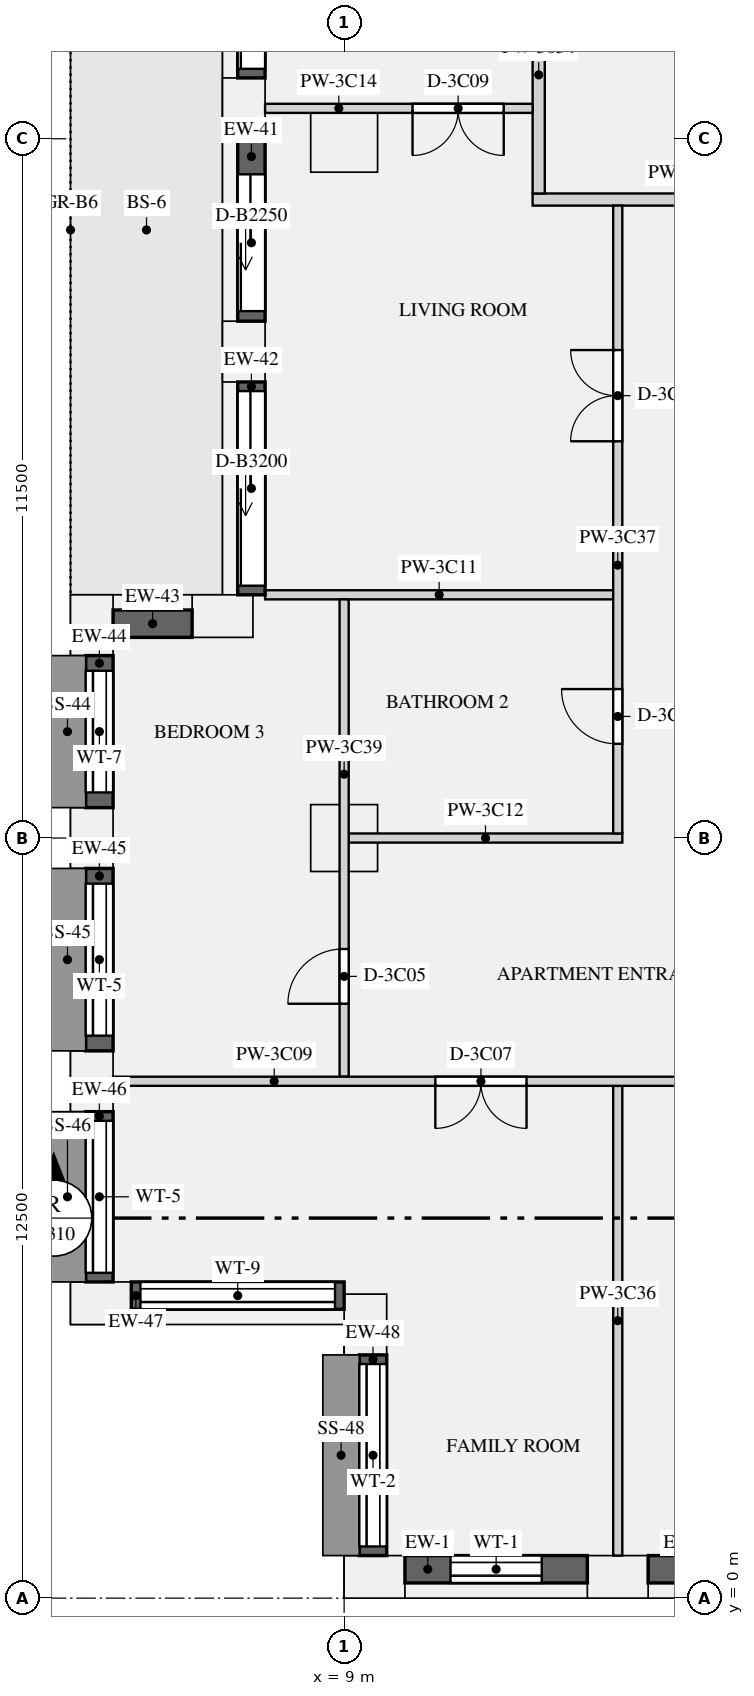
"""IFC4 building model, lengths in metres.
Left out: names, types, materials, properties, quantities, classifications, styles, units other than length and angle.
Written with IfcOpenShell. Run it as: python <this file> out.ifc"""

import sys

from ifc_helpers import new_model, si_unit, direction, frame, frame_2d, origin, origin_2d, place, context, subcontext, project, spatial, rectangle, extrude, element, fill, save


model = new_model("IFC4")
c1 = context("Model", 3, precision=1e-05, world=origin(), true_north=direction((0.0, 1.0)))
c2 = subcontext(c1, "Body", "Model", "MODEL_VIEW")
j1 = project(units=[si_unit("LENGTHUNIT", "METRE"), si_unit("PLANEANGLEUNIT", "RADIAN")], contexts=[c1])
p1 = place(None, origin())
s1 = spatial("IfcSite", under=j1, at=p1, CompositionType="ELEMENT")
p2 = place(p1, origin())
s2 = spatial("IfcBuilding", under=s1, at=p2, CompositionType="ELEMENT")
p3 = place(p2, frame((0.0, 0.0, 160.2)))
s3 = spatial("IfcBuildingStorey", under=s2, at=p3, CompositionType="ELEMENT", Elevation=160.2)
for number, where, z_axis, x_axis in (
    (1, (9.5, 0.35, 0.0), (0.0, 0.0, 1.0), (1.0, 0.0, 0.0)),
    (2, (13.5, 0.35, 0.0), (0.0, 0.0, 1.0), (1.0, 0.0, 0.0)),
    (3, (7.35, 24.5, 0.0), (0.0, 0.0, 1.0), (0.0, -1.0, 0.0)),
    (4, (7.35, 20.5, 0.0), (0.0, 0.0, 1.0), (0.0, -1.0, 0.0)),
    (5, (7.0, 16.15, 0.0), (0.0, 0.0, 1.0), (-1.0, 0.0, 0.0)),
    (6, (4.85, 16.0, 0.0), (0.0, 0.0, 1.0), (0.0, -1.0, 0.0)),
    (7, (4.85, 12.5, 0.0), (0.0, 0.0, 1.0), (0.0, -1.0, 0.0)),
    (8, (4.85, 8.5, 0.0), (0.0, 0.0, 1.0), (0.0, -1.0, 0.0)),
    (9, (5.0, 4.85, 0.0), (0.0, 0.0, 1.0), (1.0, 0.0, 0.0)),
    (10, (9.35, 4.5, 0.0), (0.0, 0.0, 1.0), (0.0, -1.0, 0.0)),
):
    element("IfcColumn", number, at=place(p3, frame(where, z_axis=z_axis, x_axis=x_axis)), inside=s3, PredefinedType="USERDEFINED", context=c2, shape_type="SweptSolid", body=[
        extrude(rectangle(XDim=1.0, YDim=0.7, at=origin_2d()), origin(), (0.0, 0.0, 1.0), 3.15),
    ])
for number, where, z_axis, x_axis in (
    (11, (9.0, 24.0, 0.0), (0.0, 0.0, 1.0), (1.0, 0.0, 0.0)),
    (12, (9.0, 12.5, 0.0), (0.0, 0.0, 1.0), (1.0, 0.0, 0.0)),
):
    element("IfcColumn", number, at=place(p3, frame(where, z_axis=z_axis, x_axis=x_axis)), inside=s3, PredefinedType="COLUMN", context=c2, shape_type="SweptSolid", body=[
        extrude(rectangle(XDim=1.1, YDim=1.1, at=origin_2d()), origin(), (0.0, 0.0, 1.0), 3.15),
    ])
p4 = place(p3, frame((10.0, 0.475, 0.9), z_axis=(0.0, 0.0, 1.0), x_axis=(1.0, 0.0, 0.0)))
e13 = element("IfcWall", 13, at=p4, inside=s3, PredefinedType="SOLIDWALL", context=c2, shape_type="SweptSolid", body=[
    extrude(rectangle(XDim=3.0, YDim=0.45, at=frame_2d((1.5, 0.0))), origin(), (0.0, 0.0, 1.0), 1.93),
])
p5 = place(p4, frame((0.75, 0.0, 0.15)))
e14 = element("IfcOpeningElement", 14, at=p5, cuts=e13, PredefinedType="OPENING", context=c2, shape_type="SweptSolid", body=[
    extrude(rectangle(XDim=1.5, YDim=1.5, at=frame_2d((0.75, 0.75))), frame((0.0, 0.235, 0.0), z_axis=(0.0, -1.0, 0.0), x_axis=(1.0, 0.0, 0.0)), (0.0, 0.0, 1.0), 0.47),
])
p6 = place(p3, frame((14.0, 0.475, 0.9), z_axis=(0.0, 0.0, 1.0), x_axis=(1.0, 0.0, 0.0)))
e15 = element("IfcWall", 15, at=p6, inside=s3, PredefinedType="SOLIDWALL", context=c2, shape_type="SweptSolid", body=[
    extrude(rectangle(XDim=4.0, YDim=0.45, at=frame_2d((2.0, 0.0))), origin(), (0.0, 0.0, 1.0), 1.93),
])
p7 = place(p6, frame((1.25, 0.0, 0.15)))
e16 = element("IfcOpeningElement", 16, at=p7, cuts=e15, PredefinedType="OPENING", context=c2, shape_type="SweptSolid", body=[
    extrude(rectangle(XDim=1.5, YDim=1.5, at=frame_2d((0.75, 0.75))), frame((0.0, 0.235, 0.0), z_axis=(0.0, -1.0, 0.0), x_axis=(1.0, 0.0, 0.0)), (0.0, 0.0, 1.0), 0.47),
])
p8 = place(p3, frame((7.475, 28.0, 0.0), z_axis=(0.0, 0.0, 1.0), x_axis=(0.0, -1.0, 0.0)))
e17 = element("IfcWall", 17, at=p8, inside=s3, PredefinedType="SOLIDWALL", context=c2, shape_type="SweptSolid", body=[
    extrude(rectangle(XDim=3.0, YDim=0.45, at=frame_2d((1.5, 0.0))), origin(), (0.0, 0.0, 1.0), 2.83),
])
p9 = place(p8, frame((0.15, 0.0, 0.0)))
e18 = element("IfcOpeningElement", 18, at=p9, cuts=e17, PredefinedType="OPENING", context=c2, shape_type="SweptSolid", body=[
    extrude(rectangle(XDim=2.7, YDim=2.3, at=frame_2d((1.35, 1.15))), frame((0.0, 0.235, 0.0), z_axis=(0.0, -1.0, 0.0), x_axis=(1.0, 0.0, 0.0)), (0.0, 0.0, 1.0), 0.47),
])
p10 = place(p3, frame((7.475, 24.0, 0.0), z_axis=(0.0, 0.0, 1.0), x_axis=(0.0, -1.0, 0.0)))
e19 = element("IfcWall", 19, at=p10, inside=s3, PredefinedType="SOLIDWALL", context=c2, shape_type="SweptSolid", body=[
    extrude(rectangle(XDim=3.0, YDim=0.45, at=frame_2d((1.5, 0.0))), origin(), (0.0, 0.0, 1.0), 2.83),
])
p11 = place(p10, frame((0.585, 0.0, 0.0)))
e20 = element("IfcOpeningElement", 20, at=p11, cuts=e19, PredefinedType="OPENING", context=c2, shape_type="SweptSolid", body=[
    extrude(rectangle(XDim=2.25, YDim=2.3, at=frame_2d((1.125, 1.15))), frame((0.0, 0.235, 0.0), z_axis=(0.0, -1.0, 0.0), x_axis=(1.0, 0.0, 0.0)), (0.0, 0.0, 1.0), 0.47),
])
p12 = place(p3, frame((7.475, 20.0, 0.0), z_axis=(0.0, 0.0, 1.0), x_axis=(0.0, -1.0, 0.0)))
e21 = element("IfcWall", 21, at=p12, inside=s3, PredefinedType="SOLIDWALL", context=c2, shape_type="SweptSolid", body=[
    extrude(rectangle(XDim=3.5, YDim=0.45, at=frame_2d((1.75, 0.0))), origin(), (0.0, 0.0, 1.0), 2.83),
])
p13 = place(p12, frame((0.15, 0.0, 0.0)))
e22 = element("IfcOpeningElement", 22, at=p13, cuts=e21, PredefinedType="OPENING", context=c2, shape_type="SweptSolid", body=[
    extrude(rectangle(XDim=3.2, YDim=2.3, at=frame_2d((1.6, 1.15))), frame((0.0, 0.235, 0.0), z_axis=(0.0, -1.0, 0.0), x_axis=(1.0, 0.0, 0.0)), (0.0, 0.0, 1.0), 0.47),
])
p14 = place(p3, frame((6.5, 16.025, 0.9), z_axis=(0.0, 0.0, 1.0), x_axis=(-1.0, 0.0, 0.0)))
e23 = element("IfcWall", 23, at=p14, inside=s3, PredefinedType="SOLIDWALL", context=c2, shape_type="SweptSolid", body=[
    extrude(rectangle(XDim=1.3, YDim=0.45, at=frame_2d((0.65, 0.0))), origin(), (0.0, 0.0, 1.0), 1.93),
])
p15 = place(p3, frame((4.975, 15.5, 0.9), z_axis=(0.0, 0.0, 1.0), x_axis=(0.0, -1.0, 0.0)))
e24 = element("IfcWall", 24, at=p15, inside=s3, PredefinedType="SOLIDWALL", context=c2, shape_type="SweptSolid", body=[
    extrude(rectangle(XDim=2.5, YDim=0.45, at=frame_2d((1.25, 0.0))), origin(), (0.0, 0.0, 1.0), 1.93),
])
p16 = place(p15, frame((0.25, 0.0, 0.15)))
e25 = element("IfcOpeningElement", 25, at=p16, cuts=e24, PredefinedType="OPENING", context=c2, shape_type="SweptSolid", body=[
    extrude(rectangle(XDim=2.0, YDim=1.5, at=frame_2d((1.0, 0.75))), frame((0.0, 0.235, 0.0), z_axis=(0.0, -1.0, 0.0), x_axis=(1.0, 0.0, 0.0)), (0.0, 0.0, 1.0), 0.47),
])
p17 = place(p3, frame((4.975, 12.0, 0.9), z_axis=(0.0, 0.0, 1.0), x_axis=(0.0, -1.0, 0.0)))
e26 = element("IfcWall", 26, at=p17, inside=s3, PredefinedType="SOLIDWALL", context=c2, shape_type="SweptSolid", body=[
    extrude(rectangle(XDim=3.0, YDim=0.45, at=frame_2d((1.5, 0.0))), origin(), (0.0, 0.0, 1.0), 1.93),
])
p18 = place(p17, frame((0.25, 0.0, 0.15)))
e27 = element("IfcOpeningElement", 27, at=p18, cuts=e26, PredefinedType="OPENING", context=c2, shape_type="SweptSolid", body=[
    extrude(rectangle(XDim=2.5, YDim=1.5, at=frame_2d((1.25, 0.75))), frame((0.0, 0.235, 0.0), z_axis=(0.0, -1.0, 0.0), x_axis=(1.0, 0.0, 0.0)), (0.0, 0.0, 1.0), 0.47),
])
p19 = place(p3, frame((4.975, 8.0, 0.9), z_axis=(0.0, 0.0, 1.0), x_axis=(0.0, -1.0, 0.0)))
e28 = element("IfcWall", 28, at=p19, inside=s3, PredefinedType="SOLIDWALL", context=c2, shape_type="SweptSolid", body=[
    extrude(rectangle(XDim=2.8, YDim=0.45, at=frame_2d((1.4, 0.0))), origin(), (0.0, 0.0, 1.0), 1.93),
])
p20 = place(p19, frame((0.15, 0.0, 0.15)))
e29 = element("IfcOpeningElement", 29, at=p20, cuts=e28, PredefinedType="OPENING", context=c2, shape_type="SweptSolid", body=[
    extrude(rectangle(XDim=2.5, YDim=1.5, at=frame_2d((1.25, 0.75))), frame((0.0, 0.235, 0.0), z_axis=(0.0, -1.0, 0.0), x_axis=(1.0, 0.0, 0.0)), (0.0, 0.0, 1.0), 0.47),
])
p21 = place(p3, frame((5.5, 4.975, 0.9), z_axis=(0.0, 0.0, 1.0), x_axis=(1.0, 0.0, 0.0)))
e30 = element("IfcWall", 30, at=p21, inside=s3, PredefinedType="SOLIDWALL", context=c2, shape_type="SweptSolid", body=[
    extrude(rectangle(XDim=3.5, YDim=0.45, at=frame_2d((1.75, 0.0))), origin(), (0.0, 0.0, 1.0), 1.93),
])
p22 = place(p21, frame((0.15, 0.0, 0.15)))
e31 = element("IfcOpeningElement", 31, at=p22, cuts=e30, PredefinedType="OPENING", context=c2, shape_type="SweptSolid", body=[
    extrude(rectangle(XDim=3.2, YDim=1.5, at=frame_2d((1.6, 0.75))), frame((0.0, 0.235, 0.0), z_axis=(0.0, -1.0, 0.0), x_axis=(1.0, 0.0, 0.0)), (0.0, 0.0, 1.0), 0.47),
])
p23 = place(p3, frame((9.475, 4.0, 0.9), z_axis=(0.0, 0.0, 1.0), x_axis=(0.0, -1.0, 0.0)))
e32 = element("IfcWall", 32, at=p23, inside=s3, PredefinedType="SOLIDWALL", context=c2, shape_type="SweptSolid", body=[
    extrude(rectangle(XDim=3.3, YDim=0.45, at=frame_2d((1.65, 0.0))), origin(), (0.0, 0.0, 1.0), 1.93),
])
p24 = place(p23, frame((0.15, 0.0, 0.15)))
e33 = element("IfcOpeningElement", 33, at=p24, cuts=e32, PredefinedType="OPENING", context=c2, shape_type="SweptSolid", body=[
    extrude(rectangle(XDim=3.0, YDim=1.5, at=frame_2d((1.5, 0.75))), frame((0.0, 0.235, 0.0), z_axis=(0.0, -1.0, 0.0), x_axis=(1.0, 0.0, 0.0)), (0.0, 0.0, 1.0), 0.47),
])
p25 = place(p3, frame((12.1, 23.0, 0.0), z_axis=(0.0, 0.0, 1.0), x_axis=(1.0, 0.0, 0.0)))
e34 = element("IfcWall", 34, at=p25, inside=s3, PredefinedType="PARTITIONING", context=c2, shape_type="SweptSolid", body=[
    extrude(rectangle(XDim=5.0, YDim=0.2, at=frame_2d((2.5, 0.0))), origin(), (0.0, 0.0, 1.0), 2.83),
])
p26 = place(p3, frame((12.2, 23.1, 0.0), z_axis=(0.0, 0.0, 1.0), x_axis=(0.0, 1.0, 0.0)))
e35 = element("IfcWall", 35, at=p26, inside=s3, PredefinedType="PARTITIONING", context=c2, shape_type="SweptSolid", body=[
    extrude(rectangle(XDim=3.9, YDim=0.2, at=frame_2d((1.95, 0.0))), origin(), (0.0, 0.0, 1.0), 2.83),
])
p27 = place(p3, frame((5.2, 8.5, 0.0), z_axis=(0.0, 0.0, 1.0), x_axis=(1.0, 0.0, 0.0)))
e36 = element("IfcWall", 36, at=p27, inside=s3, PredefinedType="PARTITIONING", context=c2, shape_type="SweptSolid", body=[
    extrude(rectangle(XDim=12.8, YDim=0.15, at=frame_2d((6.4, 0.0))), origin(), (0.0, 0.0, 1.0), 2.83),
])
p28 = place(p27, frame((10.1, 0.0, 0.0)))
e37 = element("IfcOpeningElement", 37, at=p28, cuts=e36, PredefinedType="OPENING", context=c2, shape_type="SweptSolid", body=[
    extrude(rectangle(XDim=0.9, YDim=2.1, at=frame_2d((0.45, 1.05))), frame((0.0, 0.085, 0.0), z_axis=(0.0, -1.0, 0.0), x_axis=(1.0, 0.0, 0.0)), (0.0, 0.0, 1.0), 0.17),
])
p29 = place(p27, frame((5.3, 0.0, 0.0)))
e38 = element("IfcOpeningElement", 38, at=p29, cuts=e36, PredefinedType="OPENING", context=c2, shape_type="SweptSolid", body=[
    extrude(rectangle(XDim=1.5, YDim=2.1, at=frame_2d((0.75, 1.05))), frame((0.0, 0.085, 0.0), z_axis=(0.0, -1.0, 0.0), x_axis=(1.0, 0.0, 0.0)), (0.0, 0.0, 1.0), 0.17),
])
p30 = place(p3, frame((7.7, 16.5, 0.0), z_axis=(0.0, 0.0, 1.0), x_axis=(1.0, 0.0, 0.0)))
e39 = element("IfcWall", 39, at=p30, inside=s3, PredefinedType="PARTITIONING", context=c2, shape_type="SweptSolid", body=[
    extrude(rectangle(XDim=5.725, YDim=0.15, at=frame_2d((2.863, 0.0))), origin(), (0.0, 0.0, 1.0), 2.83),
])
p31 = place(p3, frame((9.075, 12.5, 0.0), z_axis=(0.0, 0.0, 1.0), x_axis=(1.0, 0.0, 0.0)))
e40 = element("IfcWall", 40, at=p31, inside=s3, PredefinedType="PARTITIONING", context=c2, shape_type="SweptSolid", body=[
    extrude(rectangle(XDim=4.5, YDim=0.15, at=frame_2d((2.25, 0.0))), origin(), (0.0, 0.0, 1.0), 2.83),
])
p32 = place(p3, frame((7.7, 24.5, 0.0), z_axis=(0.0, 0.0, 1.0), x_axis=(1.0, 0.0, 0.0)))
e41 = element("IfcWall", 41, at=p32, inside=s3, PredefinedType="PARTITIONING", context=c2, shape_type="SweptSolid", body=[
    extrude(rectangle(XDim=4.4, YDim=0.15, at=frame_2d((2.2, 0.0))), origin(), (0.0, 0.0, 1.0), 2.83),
])
p33 = place(p32, frame((2.425, 0.0, 0.0)))
e42 = element("IfcOpeningElement", 42, at=p33, cuts=e41, PredefinedType="OPENING", context=c2, shape_type="SweptSolid", body=[
    extrude(rectangle(XDim=1.5, YDim=2.1, at=frame_2d((0.75, 1.05))), frame((0.0, 0.085, 0.0), z_axis=(0.0, -1.0, 0.0), x_axis=(1.0, 0.0, 0.0)), (0.0, 0.0, 1.0), 0.17),
])
p34 = place(p3, frame((13.5, 0.7, 0.0), z_axis=(0.0, 0.0, 1.0), x_axis=(0.0, 1.0, 0.0)))
e43 = element("IfcWall", 43, at=p34, inside=s3, PredefinedType="PARTITIONING", context=c2, shape_type="SweptSolid", body=[
    extrude(rectangle(XDim=7.725, YDim=0.15, at=frame_2d((3.863, 0.0))), origin(), (0.0, 0.0, 1.0), 2.83),
])
p35 = place(p3, frame((13.5, 12.575, 0.0), z_axis=(0.0, 0.0, 1.0), x_axis=(0.0, 1.0, 0.0)))
e44 = element("IfcWall", 44, at=p35, inside=s3, PredefinedType="PARTITIONING", context=c2, shape_type="SweptSolid", body=[
    extrude(rectangle(XDim=10.325, YDim=0.15, at=frame_2d((5.163, 0.0))), origin(), (0.0, 0.0, 1.0), 2.83),
])
p36 = place(p35, frame((1.475, 0.0, 0.0)))
e45 = element("IfcOpeningElement", 45, at=p36, cuts=e44, PredefinedType="OPENING", context=c2, shape_type="SweptSolid", body=[
    extrude(rectangle(XDim=0.9, YDim=2.1, at=frame_2d((0.45, 1.05))), frame((0.0, 0.085, 0.0), z_axis=(0.0, -1.0, 0.0), x_axis=(1.0, 0.0, 0.0)), (0.0, 0.0, 1.0), 0.17),
])
p37 = place(p35, frame((6.45, 0.0, 0.0)))
e46 = element("IfcOpeningElement", 46, at=p37, cuts=e44, PredefinedType="OPENING", context=c2, shape_type="SweptSolid", body=[
    extrude(rectangle(XDim=1.5, YDim=2.1, at=frame_2d((0.75, 1.05))), frame((0.0, 0.085, 0.0), z_axis=(0.0, -1.0, 0.0), x_axis=(1.0, 0.0, 0.0)), (0.0, 0.0, 1.0), 0.17),
])
p38 = place(p3, frame((9.0, 8.575, 0.0), z_axis=(0.0, 0.0, 1.0), x_axis=(0.0, 1.0, 0.0)))
e47 = element("IfcWall", 47, at=p38, inside=s3, PredefinedType="PARTITIONING", context=c2, shape_type="SweptSolid", body=[
    extrude(rectangle(XDim=7.85, YDim=0.15, at=frame_2d((3.925, 0.0))), origin(), (0.0, 0.0, 1.0), 2.83),
])
p39 = place(p38, frame((1.2, 0.0, 0.0)))
e48 = element("IfcOpeningElement", 48, at=p39, cuts=e47, PredefinedType="OPENING", context=c2, shape_type="SweptSolid", body=[
    extrude(rectangle(XDim=0.9, YDim=2.1, at=frame_2d((0.45, 1.05))), frame((0.0, 0.085, 0.0), z_axis=(0.0, -1.0, 0.0), x_axis=(1.0, 0.0, 0.0)), (0.0, 0.0, 1.0), 0.17),
])
p40 = place(p5, origin())
e49 = element("IfcWindow", 49, at=p40, inside=s3, PartitioningType="SINGLE_PANEL", PredefinedType="WINDOW", context=c2, shape_type="SweptSolid", body=[
    extrude(rectangle(XDim=1.5, YDim=1.5, at=frame_2d((0.75, 0.75))), frame((0.0, -0.065, 0.0), z_axis=(0.0, -1.0, 0.0), x_axis=(1.0, 0.0, 0.0)), (0.0, 0.0, 1.0), 0.06),
])
fill(e14, e49)
p41 = place(p9, origin())
e50 = element("IfcDoor", 50, at=p41, inside=s3, OperationType="SLIDING_TO_LEFT", PredefinedType="DOOR", context=c2, shape_type="SweptSolid", body=[
    extrude(rectangle(XDim=2.7, YDim=2.3, at=frame_2d((1.35, 1.15))), frame((0.0, -0.07, 0.0), z_axis=(0.0, -1.0, 0.0), x_axis=(1.0, 0.0, 0.0)), (0.0, 0.0, 1.0), 0.05),
])
fill(e18, e50)
p42 = place(p11, origin())
e51 = element("IfcDoor", 51, at=p42, inside=s3, OperationType="SLIDING_TO_LEFT", PredefinedType="DOOR", context=c2, shape_type="SweptSolid", body=[
    extrude(rectangle(XDim=2.25, YDim=2.3, at=frame_2d((1.125, 1.15))), frame((0.0, -0.07, 0.0), z_axis=(0.0, -1.0, 0.0), x_axis=(1.0, 0.0, 0.0)), (0.0, 0.0, 1.0), 0.05),
])
fill(e20, e51)
p43 = place(p13, origin())
e52 = element("IfcDoor", 52, at=p43, inside=s3, OperationType="SLIDING_TO_LEFT", PredefinedType="DOOR", context=c2, shape_type="SweptSolid", body=[
    extrude(rectangle(XDim=3.2, YDim=2.3, at=frame_2d((1.6, 1.15))), frame((0.0, -0.07, 0.0), z_axis=(0.0, -1.0, 0.0), x_axis=(1.0, 0.0, 0.0)), (0.0, 0.0, 1.0), 0.05),
])
fill(e22, e52)
p44 = place(p16, origin())
e53 = element("IfcWindow", 53, at=p44, inside=s3, PartitioningType="SINGLE_PANEL", PredefinedType="WINDOW", context=c2, shape_type="SweptSolid", body=[
    extrude(rectangle(XDim=2.0, YDim=1.5, at=frame_2d((1.0, 0.75))), frame((0.0, -0.065, 0.0), z_axis=(0.0, -1.0, 0.0), x_axis=(1.0, 0.0, 0.0)), (0.0, 0.0, 1.0), 0.06),
])
fill(e25, e53)
p45 = place(p18, origin())
e54 = element("IfcWindow", 54, at=p45, inside=s3, PartitioningType="SINGLE_PANEL", PredefinedType="WINDOW", context=c2, shape_type="SweptSolid", body=[
    extrude(rectangle(XDim=2.5, YDim=1.5, at=frame_2d((1.25, 0.75))), frame((0.0, -0.065, 0.0), z_axis=(0.0, -1.0, 0.0), x_axis=(1.0, 0.0, 0.0)), (0.0, 0.0, 1.0), 0.06),
])
fill(e27, e54)
p46 = place(p20, origin())
e55 = element("IfcWindow", 55, at=p46, inside=s3, PartitioningType="SINGLE_PANEL", PredefinedType="WINDOW", context=c2, shape_type="SweptSolid", body=[
    extrude(rectangle(XDim=2.5, YDim=1.5, at=frame_2d((1.25, 0.75))), frame((0.0, -0.065, 0.0), z_axis=(0.0, -1.0, 0.0), x_axis=(1.0, 0.0, 0.0)), (0.0, 0.0, 1.0), 0.06),
])
fill(e29, e55)
p47 = place(p22, origin())
e56 = element("IfcWindow", 56, at=p47, inside=s3, PartitioningType="SINGLE_PANEL", PredefinedType="WINDOW", context=c2, shape_type="SweptSolid", body=[
    extrude(rectangle(XDim=3.2, YDim=1.5, at=frame_2d((1.6, 0.75))), frame((0.0, -0.065, 0.0), z_axis=(0.0, -1.0, 0.0), x_axis=(1.0, 0.0, 0.0)), (0.0, 0.0, 1.0), 0.06),
])
fill(e31, e56)
p48 = place(p24, origin())
e57 = element("IfcWindow", 57, at=p48, inside=s3, PartitioningType="SINGLE_PANEL", PredefinedType="WINDOW", context=c2, shape_type="SweptSolid", body=[
    extrude(rectangle(XDim=3.0, YDim=1.5, at=frame_2d((1.5, 0.75))), frame((0.0, -0.065, 0.0), z_axis=(0.0, -1.0, 0.0), x_axis=(1.0, 0.0, 0.0)), (0.0, 0.0, 1.0), 0.06),
])
fill(e33, e57)
p49 = place(p39, origin())
e58 = element("IfcDoor", 58, at=p49, inside=s3, OperationType="SINGLE_SWING_LEFT", PredefinedType="DOOR", context=c2, shape_type="SweptSolid", body=[
    extrude(rectangle(XDim=0.9, YDim=2.1, at=frame_2d((0.45, 1.05))), frame((0.0, 0.025, 0.0), z_axis=(0.0, -1.0, 0.0), x_axis=(1.0, 0.0, 0.0)), (0.0, 0.0, 1.0), 0.05),
])
fill(e48, e58)
p50 = place(p36, origin())
e59 = element("IfcDoor", 59, at=p50, inside=s3, OperationType="SINGLE_SWING_RIGHT", PredefinedType="DOOR", context=c2, shape_type="SweptSolid", body=[
    extrude(rectangle(XDim=0.9, YDim=2.1, at=frame_2d((0.45, 1.05))), frame((0.0, 0.025, 0.0), z_axis=(0.0, -1.0, 0.0), x_axis=(1.0, 0.0, 0.0)), (0.0, 0.0, 1.0), 0.05),
])
fill(e45, e59)
p51 = place(p29, frame((1.5, 0.0, 0.0), z_axis=(0.0, 0.0, 1.0), x_axis=(-1.0, 0.0, 0.0)))
e60 = element("IfcDoor", 60, at=p51, inside=s3, OperationType="DOUBLE_DOOR_SINGLE_SWING", PredefinedType="DOOR", context=c2, shape_type="SweptSolid", body=[
    extrude(rectangle(XDim=1.5, YDim=2.1, at=frame_2d((0.75, 1.05))), frame((0.0, 0.025, 0.0), z_axis=(0.0, -1.0, 0.0), x_axis=(1.0, 0.0, 0.0)), (0.0, 0.0, 1.0), 0.05),
])
fill(e38, e60)
p52 = place(p37, origin())
e61 = element("IfcDoor", 61, at=p52, inside=s3, OperationType="DOUBLE_DOOR_SINGLE_SWING", PredefinedType="DOOR", context=c2, shape_type="SweptSolid", body=[
    extrude(rectangle(XDim=1.5, YDim=2.1, at=frame_2d((0.75, 1.05))), frame((0.0, 0.025, 0.0), z_axis=(0.0, -1.0, 0.0), x_axis=(1.0, 0.0, 0.0)), (0.0, 0.0, 1.0), 0.05),
])
fill(e46, e61)
p53 = place(p33, frame((1.5, 0.0, 0.0), z_axis=(0.0, 0.0, 1.0), x_axis=(-1.0, 0.0, 0.0)))
e62 = element("IfcDoor", 62, at=p53, inside=s3, OperationType="DOUBLE_DOOR_SINGLE_SWING", PredefinedType="DOOR", context=c2, shape_type="SweptSolid", body=[
    extrude(rectangle(XDim=1.5, YDim=2.1, at=frame_2d((0.75, 1.05))), frame((0.0, 0.025, 0.0), z_axis=(0.0, -1.0, 0.0), x_axis=(1.0, 0.0, 0.0)), (0.0, 0.0, 1.0), 0.05),
])
fill(e42, e62)
save(model, sys.argv[1])
